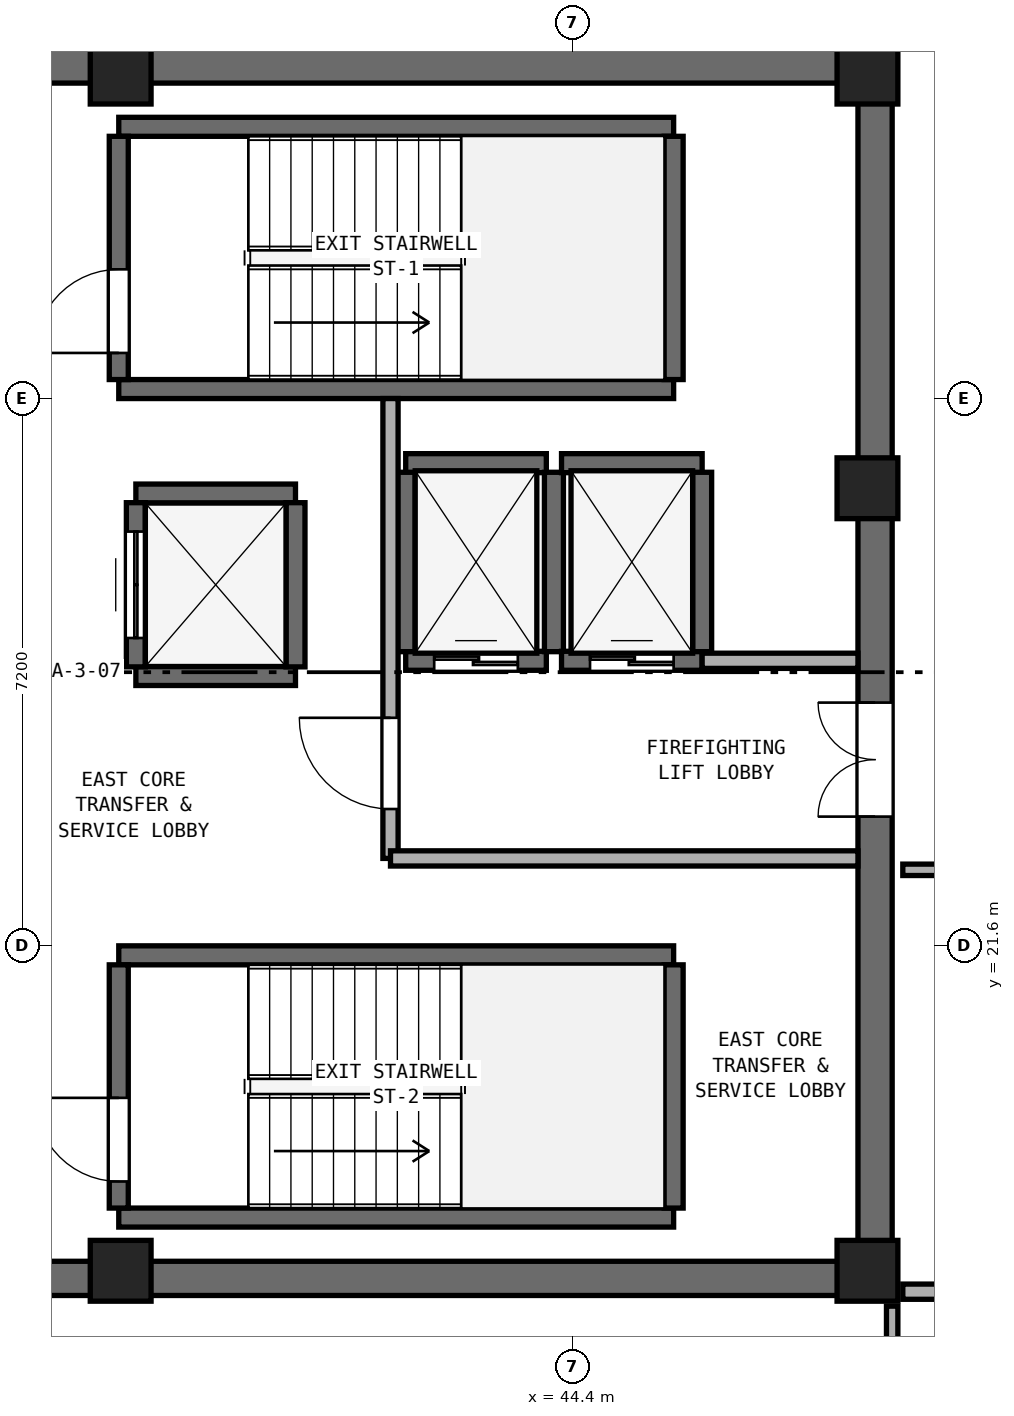
"""IFC4 building model, lengths in metres.
Left out: names, types, materials, properties, quantities, classifications, styles, units other than length and angle.
Written with IfcOpenShell. Run it as: python <this file> out.ifc"""

import sys

from ifc_helpers import new_model, si_unit, direction, frame, frame_2d, origin, origin_2d, place, context, subcontext, project, spatial, rectangle, extrude, element, fill, save


model = new_model("IFC4")
c1 = context("Model", 3, precision=1e-05, world=origin(), true_north=direction((0.0, 1.0)))
c2 = subcontext(c1, "Body", "Model", "MODEL_VIEW")
j1 = project(units=[si_unit("LENGTHUNIT", "METRE"), si_unit("PLANEANGLEUNIT", "RADIAN")], contexts=[c1])
p1 = place(None, origin())
s1 = spatial("IfcSite", under=j1, at=p1, CompositionType="ELEMENT")
p2 = place(p1, origin())
s2 = spatial("IfcBuilding", under=s1, at=p2, CompositionType="ELEMENT")
p3 = place(p2, frame((0.0, 0.0, 278.2)))
s3 = spatial("IfcBuildingStorey", under=s2, at=p3, CompositionType="ELEMENT", Elevation=278.2)
for number, where, z_axis, x_axis in (
    (1, (25.4, 17.225, 0.0), (0.0, 0.0, 1.0), (1.0, 0.0, 0.0)),
    (2, (25.4, 33.175, 0.0), (0.0, 0.0, 1.0), (1.0, 0.0, 0.0)),
):
    element("IfcWall", number, at=place(p3, frame(where, z_axis=z_axis, x_axis=x_axis)), inside=s3, PredefinedType="SHEAR", context=c2, shape_type="SweptSolid", body=[
        extrude(rectangle(XDim=23.2, YDim=0.45, at=frame_2d((11.6, 0.0))), origin(), (0.0, 0.0, 1.0), 3.54),
    ])
p4 = place(p3, frame((48.375, 17.45, 0.0), z_axis=(0.0, 0.0, 1.0), x_axis=(0.0, 1.0, 0.0)))
e3 = element("IfcWall", 3, at=p4, inside=s3, PredefinedType="SHEAR", context=c2, shape_type="SweptSolid", body=[
    extrude(rectangle(XDim=15.5, YDim=0.45, at=frame_2d((7.75, 0.0))), origin(), (0.0, 0.0, 1.0), 3.54),
])
p5 = place(p4, frame((5.85, 0.0, 0.0)))
e4 = element("IfcOpeningElement", 4, at=p5, cuts=e3, PredefinedType="OPENING", context=c2, shape_type="SweptSolid", body=[
    extrude(rectangle(XDim=1.5, YDim=2.15, at=frame_2d((0.75, 1.075))), frame((0.0, 0.235, 0.0), z_axis=(0.0, -1.0, 0.0), x_axis=(1.0, 0.0, 0.0)), (0.0, 0.0, 1.0), 0.47),
])
for number, where, z_axis, x_axis in (
    (5, (38.45, 17.325, 0.0), (0.0, 0.0, 1.0), (1.0, 0.0, 0.0)),
    (6, (48.275, 17.325, 0.0), (0.0, 0.0, 1.0), (1.0, 0.0, 0.0)),
    (7, (48.275, 27.62, 0.0), (0.0, 0.0, 1.0), (1.0, 0.0, 0.0)),
    (8, (48.275, 33.075, 0.0), (0.0, 0.0, 1.0), (1.0, 0.0, 0.0)),
    (9, (38.45, 33.075, 0.0), (0.0, 0.0, 1.0), (1.0, 0.0, 0.0)),
):
    element("IfcColumn", number, at=place(p3, frame(where, z_axis=z_axis, x_axis=x_axis)), inside=s3, PredefinedType="PILASTER", context=c2, shape_type="SweptSolid", body=[
        extrude(rectangle(XDim=0.8, YDim=0.8, at=origin_2d()), origin(), (0.0, 0.0, 1.0), 3.8),
    ])
for number, where, z_axis, x_axis in (
    (10, (38.425, 28.925, 0.0), (0.0, 0.0, 1.0), (1.0, 0.0, 0.0)),
    (11, (38.425, 32.375, 0.0), (0.0, 0.0, 1.0), (1.0, 0.0, 0.0)),
):
    element("IfcWall", number, at=place(p3, frame(where, z_axis=z_axis, x_axis=x_axis)), inside=s3, PredefinedType="SHEAR", context=c2, shape_type="SweptSolid", body=[
        extrude(rectangle(XDim=7.3, YDim=0.25, at=frame_2d((3.65, 0.0))), origin(), (0.0, 0.0, 1.0), 3.54),
    ])
p6 = place(p3, frame((38.425, 29.05, 0.0), z_axis=(0.0, 0.0, 1.0), x_axis=(0.0, 1.0, 0.0)))
e12 = element("IfcWall", 12, at=p6, inside=s3, PredefinedType="SHEAR", context=c2, shape_type="SweptSolid", body=[
    extrude(rectangle(XDim=3.2, YDim=0.25, at=frame_2d((1.6, 0.0))), origin(), (0.0, 0.0, 1.0), 3.54),
])
p7 = place(p6, frame((0.35, 0.0, 0.0)))
e13 = element("IfcOpeningElement", 13, at=p7, cuts=e12, PredefinedType="OPENING", context=c2, shape_type="SweptSolid", body=[
    extrude(rectangle(XDim=1.1, YDim=2.15, at=frame_2d((0.55, 1.075))), frame((0.0, 0.135, 0.0), z_axis=(0.0, -1.0, 0.0), x_axis=(1.0, 0.0, 0.0)), (0.0, 0.0, 1.0), 0.27),
])
p8 = place(p3, frame((45.725, 29.05, 0.0), z_axis=(0.0, 0.0, 1.0), x_axis=(0.0, 1.0, 0.0)))
e14 = element("IfcWall", 14, at=p8, inside=s3, PredefinedType="SHEAR", context=c2, shape_type="SweptSolid", body=[
    extrude(rectangle(XDim=3.2, YDim=0.25, at=frame_2d((1.6, 0.0))), origin(), (0.0, 0.0, 1.0), 3.54),
])
for number, where, z_axis, x_axis in (
    (15, (38.425, 18.025, 0.0), (0.0, 0.0, 1.0), (1.0, 0.0, 0.0)),
    (16, (38.425, 21.475, 0.0), (0.0, 0.0, 1.0), (1.0, 0.0, 0.0)),
):
    element("IfcWall", number, at=place(p3, frame(where, z_axis=z_axis, x_axis=x_axis)), inside=s3, PredefinedType="SHEAR", context=c2, shape_type="SweptSolid", body=[
        extrude(rectangle(XDim=7.3, YDim=0.25, at=frame_2d((3.65, 0.0))), origin(), (0.0, 0.0, 1.0), 3.54),
    ])
p9 = place(p3, frame((38.425, 18.15, 0.0), z_axis=(0.0, 0.0, 1.0), x_axis=(0.0, 1.0, 0.0)))
e17 = element("IfcWall", 17, at=p9, inside=s3, PredefinedType="SHEAR", context=c2, shape_type="SweptSolid", body=[
    extrude(rectangle(XDim=3.2, YDim=0.25, at=frame_2d((1.6, 0.0))), origin(), (0.0, 0.0, 1.0), 3.54),
])
p10 = place(p9, frame((0.35, 0.0, 0.0)))
e18 = element("IfcOpeningElement", 18, at=p10, cuts=e17, PredefinedType="OPENING", context=c2, shape_type="SweptSolid", body=[
    extrude(rectangle(XDim=1.1, YDim=2.15, at=frame_2d((0.55, 1.075))), frame((0.0, 0.135, 0.0), z_axis=(0.0, -1.0, 0.0), x_axis=(1.0, 0.0, 0.0)), (0.0, 0.0, 1.0), 0.27),
])
p11 = place(p3, frame((45.725, 18.15, 0.0), z_axis=(0.0, 0.0, 1.0), x_axis=(0.0, 1.0, 0.0)))
e19 = element("IfcWall", 19, at=p11, inside=s3, PredefinedType="SHEAR", context=c2, shape_type="SweptSolid", body=[
    extrude(rectangle(XDim=3.2, YDim=0.25, at=frame_2d((1.6, 0.0))), origin(), (0.0, 0.0, 1.0), 3.54),
])
p12 = place(p3, frame((42.2, 25.35, 0.0), z_axis=(0.0, 0.0, 1.0), x_axis=(1.0, 0.0, 0.0)))
e20 = element("IfcWall", 20, at=p12, inside=s3, PredefinedType="SHEAR", context=c2, shape_type="SweptSolid", body=[
    extrude(rectangle(XDim=1.85, YDim=0.25, at=frame_2d((0.925, 0.0))), origin(), (0.0, 0.0, 1.0), 3.54),
])
p13 = place(p12, frame((0.375, 0.0, 0.0)))
e21 = element("IfcOpeningElement", 21, at=p13, cuts=e20, PredefinedType="OPENING", context=c2, shape_type="SweptSolid", body=[
    extrude(rectangle(XDim=1.1, YDim=2.15, at=frame_2d((0.55, 1.075))), frame((0.0, 0.135, 0.0), z_axis=(0.0, -1.0, 0.0), x_axis=(1.0, 0.0, 0.0)), (0.0, 0.0, 1.0), 0.27),
])
p14 = place(p3, frame((42.2, 27.95, 0.0), z_axis=(0.0, 0.0, 1.0), x_axis=(1.0, 0.0, 0.0)))
e22 = element("IfcWall", 22, at=p14, inside=s3, PredefinedType="SHEAR", context=c2, shape_type="SweptSolid", body=[
    extrude(rectangle(XDim=1.85, YDim=0.25, at=frame_2d((0.925, 0.0))), origin(), (0.0, 0.0, 1.0), 3.54),
])
for number, where, z_axis, x_axis in (
    (23, (42.2, 25.47, 0.0), (0.0, 0.0, 1.0), (0.0, 1.0, 0.0)),
    (24, (44.15, 25.47, 0.0), (0.0, 0.0, 1.0), (0.0, 1.0, 0.0)),
):
    element("IfcWall", number, at=place(p3, frame(where, z_axis=z_axis, x_axis=x_axis)), inside=s3, PredefinedType="SHEAR", context=c2, shape_type="SweptSolid", body=[
        extrude(rectangle(XDim=2.36, YDim=0.25, at=frame_2d((1.18, 0.0))), origin(), (0.0, 0.0, 1.0), 3.54),
    ])
p15 = place(p3, frame((44.25, 25.35, 0.0), z_axis=(0.0, 0.0, 1.0), x_axis=(1.0, 0.0, 0.0)))
e25 = element("IfcWall", 25, at=p15, inside=s3, PredefinedType="SHEAR", context=c2, shape_type="SweptSolid", body=[
    extrude(rectangle(XDim=1.85, YDim=0.25, at=frame_2d((0.925, 0.0))), origin(), (0.0, 0.0, 1.0), 3.54),
])
p16 = place(p15, frame((0.375, 0.0, 0.0)))
e26 = element("IfcOpeningElement", 26, at=p16, cuts=e25, PredefinedType="OPENING", context=c2, shape_type="SweptSolid", body=[
    extrude(rectangle(XDim=1.1, YDim=2.15, at=frame_2d((0.55, 1.075))), frame((0.0, 0.135, 0.0), z_axis=(0.0, -1.0, 0.0), x_axis=(1.0, 0.0, 0.0)), (0.0, 0.0, 1.0), 0.27),
])
p17 = place(p3, frame((44.25, 27.95, 0.0), z_axis=(0.0, 0.0, 1.0), x_axis=(1.0, 0.0, 0.0)))
e27 = element("IfcWall", 27, at=p17, inside=s3, PredefinedType="SHEAR", context=c2, shape_type="SweptSolid", body=[
    extrude(rectangle(XDim=1.85, YDim=0.25, at=frame_2d((0.925, 0.0))), origin(), (0.0, 0.0, 1.0), 3.54),
])
p18 = place(p3, frame((46.1, 25.47, 0.0), z_axis=(0.0, 0.0, 1.0), x_axis=(0.0, 1.0, 0.0)))
e28 = element("IfcWall", 28, at=p18, inside=s3, PredefinedType="SHEAR", context=c2, shape_type="SweptSolid", body=[
    extrude(rectangle(XDim=2.36, YDim=0.25, at=frame_2d((1.18, 0.0))), origin(), (0.0, 0.0, 1.0), 3.54),
])
for number, where, z_axis, x_axis in (
    (29, (38.65, 25.15, 0.0), (0.0, 0.0, 1.0), (1.0, 0.0, 0.0)),
    (30, (38.65, 27.55, 0.0), (0.0, 0.0, 1.0), (1.0, 0.0, 0.0)),
):
    element("IfcWall", number, at=place(p3, frame(where, z_axis=z_axis, x_axis=x_axis)), inside=s3, PredefinedType="SHEAR", context=c2, shape_type="SweptSolid", body=[
        extrude(rectangle(XDim=2.1, YDim=0.25, at=frame_2d((1.05, 0.0))), origin(), (0.0, 0.0, 1.0), 3.54),
    ])
p19 = place(p3, frame((38.65, 25.27, 0.0), z_axis=(0.0, 0.0, 1.0), x_axis=(0.0, 1.0, 0.0)))
e31 = element("IfcWall", 31, at=p19, inside=s3, PredefinedType="SHEAR", context=c2, shape_type="SweptSolid", body=[
    extrude(rectangle(XDim=2.16, YDim=0.25, at=frame_2d((1.08, 0.0))), origin(), (0.0, 0.0, 1.0), 3.54),
])
p20 = place(p19, frame((0.38, 0.0, 0.0)))
e32 = element("IfcOpeningElement", 32, at=p20, cuts=e31, PredefinedType="OPENING", context=c2, shape_type="SweptSolid", body=[
    extrude(rectangle(XDim=1.4, YDim=2.2, at=frame_2d((0.7, 1.1))), frame((0.0, 0.135, 0.0), z_axis=(0.0, -1.0, 0.0), x_axis=(1.0, 0.0, 0.0)), (0.0, 0.0, 1.0), 0.27),
])
p21 = place(p3, frame((40.75, 25.27, 0.0), z_axis=(0.0, 0.0, 1.0), x_axis=(0.0, 1.0, 0.0)))
e33 = element("IfcWall", 33, at=p21, inside=s3, PredefinedType="SHEAR", context=c2, shape_type="SweptSolid", body=[
    extrude(rectangle(XDim=2.16, YDim=0.25, at=frame_2d((1.08, 0.0))), origin(), (0.0, 0.0, 1.0), 3.54),
])
p22 = place(p3, frame((42.0, 22.75, 0.0), z_axis=(0.0, 0.0, 1.0), x_axis=(0.0, 1.0, 0.0)))
e34 = element("IfcWall", 34, at=p22, inside=s3, PredefinedType="SOLIDWALL", context=c2, shape_type="SweptSolid", body=[
    extrude(rectangle(XDim=6.05, YDim=0.2, at=frame_2d((3.025, 0.0))), origin(), (0.0, 0.0, 1.0), 3.54),
])
p23 = place(p22, frame((0.65, 0.0, 0.0)))
e35 = element("IfcOpeningElement", 35, at=p23, cuts=e34, PredefinedType="OPENING", context=c2, shape_type="SweptSolid", body=[
    extrude(rectangle(XDim=1.2, YDim=2.15, at=frame_2d((0.6, 1.075))), frame((0.0, 0.11, 0.0), z_axis=(0.0, -1.0, 0.0), x_axis=(1.0, 0.0, 0.0)), (0.0, 0.0, 1.0), 0.22),
])
p24 = place(p3, frame((42.0, 22.75, 0.0), z_axis=(0.0, 0.0, 1.0), x_axis=(1.0, 0.0, 0.0)))
e36 = element("IfcWall", 36, at=p24, inside=s3, PredefinedType="SOLIDWALL", context=c2, shape_type="SweptSolid", body=[
    extrude(rectangle(XDim=6.15, YDim=0.2, at=frame_2d((3.075, 0.0))), origin(), (0.0, 0.0, 1.0), 3.54),
])
p25 = place(p3, frame((46.1, 25.35, 0.0), z_axis=(0.0, 0.0, 1.0), x_axis=(1.0, 0.0, 0.0)))
e37 = element("IfcWall", 37, at=p25, inside=s3, PredefinedType="SOLIDWALL", context=c2, shape_type="SweptSolid", body=[
    extrude(rectangle(XDim=2.05, YDim=0.2, at=frame_2d((1.025, 0.0))), origin(), (0.0, 0.0, 1.0), 3.54),
])
p26 = place(p3, frame((48.6, 15.2, 0.0), z_axis=(0.0, 0.0, 1.0), x_axis=(0.0, 1.0, 0.0)))
e38 = element("IfcWall", 38, at=p26, inside=s3, PredefinedType="PARTITIONING", context=c2, shape_type="SweptSolid", body=[
    extrude(rectangle(XDim=1.66, YDim=0.15, at=frame_2d((0.83, 0.0))), origin(), (0.0, 0.0, 1.0), 3.54),
])
p27 = place(p3, frame((48.74, 17.05, 0.0), z_axis=(0.0, 0.0, 1.0), x_axis=(1.0, 0.0, 0.0)))
e39 = element("IfcWall", 39, at=p27, inside=s3, PredefinedType="PARTITIONING", context=c2, shape_type="SweptSolid", body=[
    extrude(rectangle(XDim=13.655, YDim=0.2, at=frame_2d((6.828, 0.0))), origin(), (0.0, 0.0, 1.0), 2.923),
])
p28 = place(p3, frame((48.74, 22.6, 0.0), z_axis=(0.0, 0.0, 1.0), x_axis=(1.0, 0.0, 0.0)))
e40 = element("IfcWall", 40, at=p28, inside=s3, PredefinedType="PARTITIONING", context=c2, shape_type="SweptSolid", body=[
    extrude(rectangle(XDim=1.66, YDim=0.15, at=frame_2d((0.83, 0.0))), origin(), (0.0, 0.0, 1.0), 3.54),
])
p29 = place(p7, origin())
e41 = element("IfcDoor", 41, at=p29, inside=s3, OperationType="SINGLE_SWING_LEFT", PredefinedType="DOOR", context=c2, shape_type="SweptSolid", body=[
    extrude(rectangle(XDim=1.1, YDim=2.15, at=frame_2d((0.55, 1.075))), frame((0.0, 0.025, 0.0), z_axis=(0.0, -1.0, 0.0), x_axis=(1.0, 0.0, 0.0)), (0.0, 0.0, 1.0), 0.05),
])
fill(e13, e41)
p30 = place(p10, origin())
e42 = element("IfcDoor", 42, at=p30, inside=s3, OperationType="SINGLE_SWING_RIGHT", PredefinedType="DOOR", context=c2, shape_type="SweptSolid", body=[
    extrude(rectangle(XDim=1.1, YDim=2.15, at=frame_2d((0.55, 1.075))), frame((0.0, 0.025, 0.0), z_axis=(0.0, -1.0, 0.0), x_axis=(1.0, 0.0, 0.0)), (0.0, 0.0, 1.0), 0.05),
])
fill(e18, e42)
p31 = place(p13, origin())
e43 = element("IfcDoor", 43, at=p31, inside=s3, OperationType="DOUBLE_DOOR_SLIDING", PredefinedType="DOOR", context=c2, shape_type="SweptSolid", body=[
    extrude(rectangle(XDim=1.1, YDim=2.15, at=frame_2d((0.55, 1.075))), frame((0.0, 0.025, 0.0), z_axis=(0.0, -1.0, 0.0), x_axis=(1.0, 0.0, 0.0)), (0.0, 0.0, 1.0), 0.05),
])
fill(e21, e43)
p32 = place(p16, origin())
e44 = element("IfcDoor", 44, at=p32, inside=s3, OperationType="DOUBLE_DOOR_SLIDING", PredefinedType="DOOR", context=c2, shape_type="SweptSolid", body=[
    extrude(rectangle(XDim=1.1, YDim=2.15, at=frame_2d((0.55, 1.075))), frame((0.0, 0.025, 0.0), z_axis=(0.0, -1.0, 0.0), x_axis=(1.0, 0.0, 0.0)), (0.0, 0.0, 1.0), 0.05),
])
fill(e26, e44)
p33 = place(p20, origin())
e45 = element("IfcDoor", 45, at=p33, inside=s3, OperationType="DOUBLE_DOOR_SLIDING", PredefinedType="DOOR", context=c2, shape_type="SweptSolid", body=[
    extrude(rectangle(XDim=1.4, YDim=2.2, at=frame_2d((0.7, 1.1))), frame((0.0, 0.025, 0.0), z_axis=(0.0, -1.0, 0.0), x_axis=(1.0, 0.0, 0.0)), (0.0, 0.0, 1.0), 0.05),
])
fill(e32, e45)
p34 = place(p23, origin())
e46 = element("IfcDoor", 46, at=p34, inside=s3, OperationType="SINGLE_SWING_RIGHT", PredefinedType="DOOR", context=c2, shape_type="SweptSolid", body=[
    extrude(rectangle(XDim=1.2, YDim=2.15, at=frame_2d((0.6, 1.075))), frame((0.0, 0.025, 0.0), z_axis=(0.0, -1.0, 0.0), x_axis=(1.0, 0.0, 0.0)), (0.0, 0.0, 1.0), 0.05),
])
fill(e35, e46)
p35 = place(p5, origin())
e47 = element("IfcDoor", 47, at=p35, inside=s3, OperationType="DOUBLE_DOOR_SINGLE_SWING", PredefinedType="DOOR", context=c2, shape_type="SweptSolid", body=[
    extrude(rectangle(XDim=1.5, YDim=2.15, at=frame_2d((0.75, 1.075))), frame((0.0, 0.025, 0.0), z_axis=(0.0, -1.0, 0.0), x_axis=(1.0, 0.0, 0.0)), (0.0, 0.0, 1.0), 0.05),
])
fill(e4, e47)
save(model, sys.argv[1])
